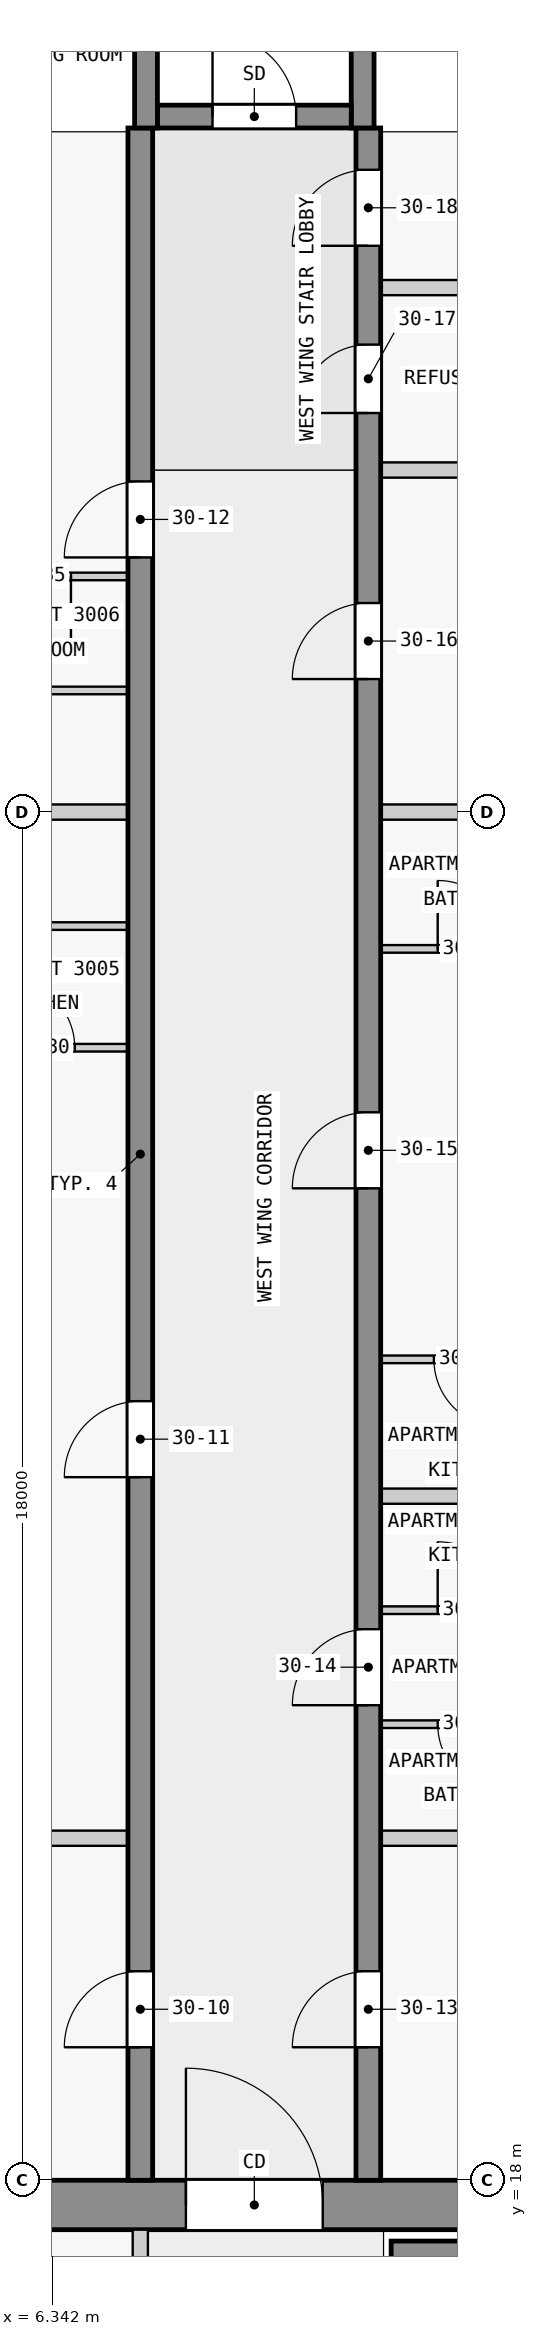
"""IFC4 building model, lengths in metres.
Left out: names, types, materials, properties, quantities, classifications, styles, units other than length and angle.
Written with IfcOpenShell. Run it as: python <this file> out.ifc"""

import sys

from ifc_helpers import new_model, si_unit, direction, frame, frame_2d, origin, place, context, subcontext, project, spatial, rectangle, extrude, element, fill, save


model = new_model("IFC4")
c1 = context("Model", 3, precision=1e-05, world=origin(), true_north=direction((0.0, 1.0)))
c2 = subcontext(c1, "Body", "Model", "MODEL_VIEW")
j1 = project(units=[si_unit("LENGTHUNIT", "METRE"), si_unit("PLANEANGLEUNIT", "RADIAN")], contexts=[c1])
p1 = place(None, origin())
s1 = spatial("IfcSite", under=j1, at=p1, CompositionType="ELEMENT")
p2 = place(p1, origin())
s2 = spatial("IfcBuilding", under=s1, at=p2, CompositionType="ELEMENT")
p3 = place(p2, frame((0.0, 0.0, 116.8)))
s3 = spatial("IfcBuildingStorey", under=s2, at=p3, CompositionType="ELEMENT", Elevation=116.8)
p4 = place(p3, frame((1.65, 17.675, 0.0), z_axis=(0.0, 0.0, 1.0), x_axis=(1.0, 0.0, 0.0)))
e1 = element("IfcWall", 1, at=p4, inside=s3, PredefinedType="SHEAR", context=c2, shape_type="SweptSolid", body=[
    extrude(rectangle(XDim=20.85, YDim=0.65, at=frame_2d((10.425, 0.0))), origin(), (0.0, 0.0, 1.0), 3.25),
])
p5 = place(p4, frame((6.45, 0.0, 0.0)))
e2 = element("IfcOpeningElement", 2, at=p5, cuts=e1, PredefinedType="OPENING", context=c2, shape_type="SweptSolid", body=[
    extrude(rectangle(XDim=1.8, YDim=2.1, at=frame_2d((0.9, 1.05))), frame((0.0, 0.335, 0.0), z_axis=(0.0, -1.0, 0.0), x_axis=(1.0, 0.0, 0.0)), (0.0, 0.0, 1.0), 0.67),
])
p6 = place(p3, frame((10.8, 17.05, 0.0), z_axis=(0.0, 0.0, 1.0), x_axis=(1.0, 0.0, 0.0)))
e3 = element("IfcWall", 3, at=p6, inside=s3, PredefinedType="SHEAR", context=c2, shape_type="SweptSolid", body=[
    extrude(rectangle(XDim=7.8, YDim=0.3, at=frame_2d((3.9, 0.0))), origin(), (0.0, 0.0, 1.0), 3.25),
])
p7 = place(p3, frame((7.725, 45.15, 0.0), z_axis=(0.0, 0.0, 1.0), x_axis=(1.0, 0.0, 0.0)))
e4 = element("IfcWall", 4, at=p7, inside=s3, PredefinedType="SHEAR", context=c2, shape_type="SweptSolid", body=[
    extrude(rectangle(XDim=2.55, YDim=0.3, at=frame_2d((1.275, 0.0))), origin(), (0.0, 0.0, 1.0), 3.5),
])
p8 = place(p7, frame((0.725, 0.0, 0.0)))
e5 = element("IfcOpeningElement", 5, at=p8, cuts=e4, PredefinedType="OPENING", context=c2, shape_type="SweptSolid", body=[
    extrude(rectangle(XDim=1.1, YDim=2.1, at=frame_2d((0.55, 1.05))), frame((0.0, 0.16, 0.0), z_axis=(0.0, -1.0, 0.0), x_axis=(1.0, 0.0, 0.0)), (0.0, 0.0, 1.0), 0.32),
])
for number, where, z_axis, x_axis in (
    (6, (7.575, 45.0, 0.0), (0.0, 0.0, 1.0), (0.0, 1.0, 0.0)),
    (7, (10.425, 45.0, 0.0), (0.0, 0.0, 1.0), (0.0, 1.0, 0.0)),
):
    element("IfcWall", number, at=place(p3, frame(where, z_axis=z_axis, x_axis=x_axis)), inside=s3, PredefinedType="SHEAR", context=c2, shape_type="SweptSolid", body=[
        extrude(rectangle(XDim=7.2, YDim=0.3, at=frame_2d((3.6, 0.0))), origin(), (0.0, 0.0, 1.0), 3.5),
    ])
p9 = place(p3, frame((7.5, 18.0, 0.0), z_axis=(0.0, 0.0, 1.0), x_axis=(0.0, 1.0, 0.0)))
e8 = element("IfcWall", 8, at=p9, inside=s3, PredefinedType="SHEAR", context=c2, shape_type="SweptSolid", body=[
    extrude(rectangle(XDim=27.0, YDim=0.325, at=frame_2d((13.5, 0.0))), origin(), (0.0, 0.0, 1.0), 3.25),
])
p10 = place(p9, frame((1.75, 0.0, 0.0)))
e9 = element("IfcOpeningElement", 9, at=p10, cuts=e8, PredefinedType="OPENING", context=c2, shape_type="SweptSolid", body=[
    extrude(rectangle(XDim=1.0, YDim=2.1, at=frame_2d((0.5, 1.05))), frame((0.0, 0.172, 0.0), z_axis=(0.0, -1.0, 0.0), x_axis=(1.0, 0.0, 0.0)), (0.0, 0.0, 1.0), 0.345),
])
p11 = place(p9, frame((9.25, 0.0, 0.0)))
e10 = element("IfcOpeningElement", 10, at=p11, cuts=e8, PredefinedType="OPENING", context=c2, shape_type="SweptSolid", body=[
    extrude(rectangle(XDim=1.0, YDim=2.1, at=frame_2d((0.5, 1.05))), frame((0.0, 0.172, 0.0), z_axis=(0.0, -1.0, 0.0), x_axis=(1.0, 0.0, 0.0)), (0.0, 0.0, 1.0), 0.345),
])
p12 = place(p9, frame((21.35, 0.0, 0.0)))
e11 = element("IfcOpeningElement", 11, at=p12, cuts=e8, PredefinedType="OPENING", context=c2, shape_type="SweptSolid", body=[
    extrude(rectangle(XDim=1.0, YDim=2.1, at=frame_2d((0.5, 1.05))), frame((0.0, 0.172, 0.0), z_axis=(0.0, -1.0, 0.0), x_axis=(1.0, 0.0, 0.0)), (0.0, 0.0, 1.0), 0.345),
])
p13 = place(p3, frame((10.5, 18.0, 0.0), z_axis=(0.0, 0.0, 1.0), x_axis=(0.0, 1.0, 0.0)))
e12 = element("IfcWall", 12, at=p13, inside=s3, PredefinedType="SHEAR", context=c2, shape_type="SweptSolid", body=[
    extrude(rectangle(XDim=27.0, YDim=0.325, at=frame_2d((13.5, 0.0))), origin(), (0.0, 0.0, 1.0), 3.25),
])
p14 = place(p13, frame((1.75, 0.0, 0.0)))
e13 = element("IfcOpeningElement", 13, at=p14, cuts=e12, PredefinedType="OPENING", context=c2, shape_type="SweptSolid", body=[
    extrude(rectangle(XDim=1.0, YDim=2.1, at=frame_2d((0.5, 1.05))), frame((0.0, 0.172, 0.0), z_axis=(0.0, -1.0, 0.0), x_axis=(1.0, 0.0, 0.0)), (0.0, 0.0, 1.0), 0.345),
])
p15 = place(p13, frame((6.25, 0.0, 0.0)))
e14 = element("IfcOpeningElement", 14, at=p15, cuts=e12, PredefinedType="OPENING", context=c2, shape_type="SweptSolid", body=[
    extrude(rectangle(XDim=1.0, YDim=2.1, at=frame_2d((0.5, 1.05))), frame((0.0, 0.172, 0.0), z_axis=(0.0, -1.0, 0.0), x_axis=(1.0, 0.0, 0.0)), (0.0, 0.0, 1.0), 0.345),
])
p16 = place(p13, frame((13.05, 0.0, 0.0)))
e15 = element("IfcOpeningElement", 15, at=p16, cuts=e12, PredefinedType="OPENING", context=c2, shape_type="SweptSolid", body=[
    extrude(rectangle(XDim=1.0, YDim=2.1, at=frame_2d((0.5, 1.05))), frame((0.0, 0.172, 0.0), z_axis=(0.0, -1.0, 0.0), x_axis=(1.0, 0.0, 0.0)), (0.0, 0.0, 1.0), 0.345),
])
p17 = place(p13, frame((19.75, 0.0, 0.0)))
e16 = element("IfcOpeningElement", 16, at=p17, cuts=e12, PredefinedType="OPENING", context=c2, shape_type="SweptSolid", body=[
    extrude(rectangle(XDim=1.0, YDim=2.1, at=frame_2d((0.5, 1.05))), frame((0.0, 0.172, 0.0), z_axis=(0.0, -1.0, 0.0), x_axis=(1.0, 0.0, 0.0)), (0.0, 0.0, 1.0), 0.345),
])
p18 = place(p13, frame((23.25, 0.0, 0.0)))
e17 = element("IfcOpeningElement", 17, at=p18, cuts=e12, PredefinedType="OPENING", context=c2, shape_type="SweptSolid", body=[
    extrude(rectangle(XDim=0.9, YDim=2.1, at=frame_2d((0.45, 1.05))), frame((0.0, 0.172, 0.0), z_axis=(0.0, -1.0, 0.0), x_axis=(1.0, 0.0, 0.0)), (0.0, 0.0, 1.0), 0.345),
])
p19 = place(p13, frame((25.45, 0.0, 0.0)))
e18 = element("IfcOpeningElement", 18, at=p19, cuts=e12, PredefinedType="OPENING", context=c2, shape_type="SweptSolid", body=[
    extrude(rectangle(XDim=1.0, YDim=2.1, at=frame_2d((0.5, 1.05))), frame((0.0, 0.172, 0.0), z_axis=(0.0, -1.0, 0.0), x_axis=(1.0, 0.0, 0.0)), (0.0, 0.0, 1.0), 0.345),
])
p20 = place(p3, frame((7.5, 10.1, 0.0), z_axis=(0.0, 0.0, 1.0), x_axis=(0.0, 1.0, 0.0)))
e19 = element("IfcWall", 19, at=p20, inside=s3, PredefinedType="PARTITIONING", context=c2, shape_type="SweptSolid", body=[
    extrude(rectangle(XDim=7.25, YDim=0.2, at=frame_2d((3.625, 0.0))), origin(), (0.0, 0.0, 1.0), 3.25),
])
p21 = place(p20, frame((1.5, 0.0, 0.0)))
e20 = element("IfcOpeningElement", 20, at=p21, cuts=e19, PredefinedType="OPENING", context=c2, shape_type="SweptSolid", body=[
    extrude(rectangle(XDim=0.9, YDim=2.1, at=frame_2d((0.45, 1.05))), frame((0.0, 0.11, 0.0), z_axis=(0.0, -1.0, 0.0), x_axis=(1.0, 0.0, 0.0)), (0.0, 0.0, 1.0), 0.22),
])
p22 = place(p20, frame((5.125, 0.0, 0.0)))
e21 = element("IfcOpeningElement", 21, at=p22, cuts=e19, PredefinedType="OPENING", context=c2, shape_type="SweptSolid", body=[
    extrude(rectangle(XDim=0.9, YDim=2.1, at=frame_2d((0.45, 1.05))), frame((0.0, 0.11, 0.0), z_axis=(0.0, -1.0, 0.0), x_axis=(1.0, 0.0, 0.0)), (0.0, 0.0, 1.0), 0.22),
])
for number, where, z_axis, x_axis in (
    (22, (7.337, 22.5, 0.0), (0.0, 0.0, 1.0), (-1.0, 0.0, 0.0)),
    (23, (17.85, 22.5, 0.0), (0.0, 0.0, 1.0), (-1.0, 0.0, 0.0)),
):
    element("IfcWall", number, at=place(p3, frame(where, z_axis=z_axis, x_axis=x_axis)), inside=s3, PredefinedType="PARTITIONING", context=c2, shape_type="SweptSolid", body=[
        extrude(rectangle(XDim=7.188, YDim=0.2, at=frame_2d((3.594, 0.0))), origin(), (0.0, 0.0, 1.0), 3.25),
    ])
p23 = place(p3, frame((13.062, 24.0, 0.0), z_axis=(0.0, 0.0, 1.0), x_axis=(-1.0, 0.0, 0.0)))
e24 = element("IfcWall", 24, at=p23, inside=s3, PredefinedType="PARTITIONING", context=c2, shape_type="SweptSolid", body=[
    extrude(rectangle(XDim=2.4, YDim=0.1, at=frame_2d((1.2, 0.0))), origin(), (0.0, 0.0, 1.0), 3.25),
])
p24 = place(p23, frame((0.75, 0.0, 0.0)))
e25 = element("IfcOpeningElement", 25, at=p24, cuts=e24, PredefinedType="OPENING", context=c2, shape_type="SweptSolid", body=[
    extrude(rectangle(XDim=0.9, YDim=2.1, at=frame_2d((0.45, 1.05))), frame((0.0, 0.06, 0.0), z_axis=(0.0, -1.0, 0.0), x_axis=(1.0, 0.0, 0.0)), (0.0, 0.0, 1.0), 0.12),
])
p25 = place(p3, frame((10.663, 25.5, 0.0), z_axis=(0.0, 0.0, 1.0), x_axis=(1.0, 0.0, 0.0)))
e26 = element("IfcWall", 26, at=p25, inside=s3, PredefinedType="PARTITIONING", context=c2, shape_type="SweptSolid", body=[
    extrude(rectangle(XDim=2.35, YDim=0.1, at=frame_2d((1.175, 0.0))), origin(), (0.0, 0.0, 1.0), 3.25),
])
p26 = place(p25, frame((0.75, 0.0, 0.0)))
e27 = element("IfcOpeningElement", 27, at=p26, cuts=e26, PredefinedType="OPENING", context=c2, shape_type="SweptSolid", body=[
    extrude(rectangle(XDim=0.9, YDim=2.1, at=frame_2d((0.45, 1.05))), frame((0.0, 0.06, 0.0), z_axis=(0.0, -1.0, 0.0), x_axis=(1.0, 0.0, 0.0)), (0.0, 0.0, 1.0), 0.12),
])
p27 = place(p3, frame((12.962, 27.0, 0.0), z_axis=(0.0, 0.0, 1.0), x_axis=(-1.0, 0.0, 0.0)))
e28 = element("IfcWall", 28, at=p27, inside=s3, PredefinedType="PARTITIONING", context=c2, shape_type="SweptSolid", body=[
    extrude(rectangle(XDim=2.3, YDim=0.2, at=frame_2d((1.15, 0.0))), origin(), (0.0, 0.0, 1.0), 3.25),
])
p28 = place(p3, frame((13.012, 28.8, 0.0), z_axis=(0.0, 0.0, 1.0), x_axis=(-1.0, 0.0, 0.0)))
e29 = element("IfcWall", 29, at=p28, inside=s3, PredefinedType="PARTITIONING", context=c2, shape_type="SweptSolid", body=[
    extrude(rectangle(XDim=2.35, YDim=0.1, at=frame_2d((1.175, 0.0))), origin(), (0.0, 0.0, 1.0), 3.25),
])
p29 = place(p28, frame((0.75, 0.0, 0.0)))
e30 = element("IfcOpeningElement", 30, at=p29, cuts=e29, PredefinedType="OPENING", context=c2, shape_type="SweptSolid", body=[
    extrude(rectangle(XDim=0.9, YDim=2.1, at=frame_2d((0.45, 1.05))), frame((0.0, 0.06, 0.0), z_axis=(0.0, -1.0, 0.0), x_axis=(1.0, 0.0, 0.0)), (0.0, 0.0, 1.0), 0.12),
])
p30 = place(p3, frame((4.988, 32.9, 0.0), z_axis=(0.0, 0.0, 1.0), x_axis=(1.0, 0.0, 0.0)))
e31 = element("IfcWall", 31, at=p30, inside=s3, PredefinedType="PARTITIONING", context=c2, shape_type="SweptSolid", body=[
    extrude(rectangle(XDim=2.35, YDim=0.1, at=frame_2d((1.175, 0.0))), origin(), (0.0, 0.0, 1.0), 3.25),
])
p31 = place(p30, frame((0.75, 0.0, 0.0)))
e32 = element("IfcOpeningElement", 32, at=p31, cuts=e31, PredefinedType="OPENING", context=c2, shape_type="SweptSolid", body=[
    extrude(rectangle(XDim=0.9, YDim=2.1, at=frame_2d((0.45, 1.05))), frame((0.0, 0.06, 0.0), z_axis=(0.0, -1.0, 0.0), x_axis=(1.0, 0.0, 0.0)), (0.0, 0.0, 1.0), 0.12),
])
p32 = place(p3, frame((10.663, 34.2, 0.0), z_axis=(0.0, 0.0, 1.0), x_axis=(1.0, 0.0, 0.0)))
e33 = element("IfcWall", 33, at=p32, inside=s3, PredefinedType="PARTITIONING", context=c2, shape_type="SweptSolid", body=[
    extrude(rectangle(XDim=2.35, YDim=0.1, at=frame_2d((1.175, 0.0))), origin(), (0.0, 0.0, 1.0), 3.25),
])
p33 = place(p32, frame((0.75, 0.0, 0.0)))
e34 = element("IfcOpeningElement", 34, at=p33, cuts=e33, PredefinedType="OPENING", context=c2, shape_type="SweptSolid", body=[
    extrude(rectangle(XDim=0.9, YDim=2.1, at=frame_2d((0.45, 1.05))), frame((0.0, 0.06, 0.0), z_axis=(0.0, -1.0, 0.0), x_axis=(1.0, 0.0, 0.0)), (0.0, 0.0, 1.0), 0.12),
])
p34 = place(p3, frame((7.337, 34.5, 0.0), z_axis=(0.0, 0.0, 1.0), x_axis=(-1.0, 0.0, 0.0)))
e35 = element("IfcWall", 35, at=p34, inside=s3, PredefinedType="PARTITIONING", context=c2, shape_type="SweptSolid", body=[
    extrude(rectangle(XDim=2.35, YDim=0.1, at=frame_2d((1.175, 0.0))), origin(), (0.0, 0.0, 1.0), 3.25),
])
p35 = place(p3, frame((7.337, 36.0, 0.0), z_axis=(0.0, 0.0, 1.0), x_axis=(-1.0, 0.0, 0.0)))
e36 = element("IfcWall", 36, at=p35, inside=s3, PredefinedType="PARTITIONING", context=c2, shape_type="SweptSolid", body=[
    extrude(rectangle(XDim=2.3, YDim=0.2, at=frame_2d((1.15, 0.0))), origin(), (0.0, 0.0, 1.0), 3.25),
])
p36 = place(p3, frame((16.6, 36.0, 0.0), z_axis=(0.0, 0.0, 1.0), x_axis=(-1.0, 0.0, 0.0)))
e37 = element("IfcWall", 37, at=p36, inside=s3, PredefinedType="PARTITIONING", context=c2, shape_type="SweptSolid", body=[
    extrude(rectangle(XDim=5.938, YDim=0.2, at=frame_2d((2.969, 0.0))), origin(), (0.0, 0.0, 1.0), 3.25),
])
p37 = place(p3, frame((7.337, 37.6, 0.0), z_axis=(0.0, 0.0, 1.0), x_axis=(-1.0, 0.0, 0.0)))
e38 = element("IfcWall", 38, at=p37, inside=s3, PredefinedType="PARTITIONING", context=c2, shape_type="SweptSolid", body=[
    extrude(rectangle(XDim=2.35, YDim=0.1, at=frame_2d((1.175, 0.0))), origin(), (0.0, 0.0, 1.0), 3.25),
])
p38 = place(p3, frame((7.337, 39.1, 0.0), z_axis=(0.0, 0.0, 1.0), x_axis=(-1.0, 0.0, 0.0)))
e39 = element("IfcWall", 39, at=p38, inside=s3, PredefinedType="PARTITIONING", context=c2, shape_type="SweptSolid", body=[
    extrude(rectangle(XDim=2.35, YDim=0.1, at=frame_2d((1.175, 0.0))), origin(), (0.0, 0.0, 1.0), 3.25),
])
p39 = place(p38, frame((0.75, 0.0, 0.0)))
e40 = element("IfcOpeningElement", 40, at=p39, cuts=e39, PredefinedType="OPENING", context=c2, shape_type="SweptSolid", body=[
    extrude(rectangle(XDim=0.9, YDim=2.1, at=frame_2d((0.45, 1.05))), frame((0.0, 0.06, 0.0), z_axis=(0.0, -1.0, 0.0), x_axis=(1.0, 0.0, 0.0)), (0.0, 0.0, 1.0), 0.12),
])
p40 = place(p3, frame((18.08, 40.5, 0.0), z_axis=(0.0, 0.0, 1.0), x_axis=(-1.0, 0.0, 0.0)))
e41 = element("IfcWall", 41, at=p40, inside=s3, PredefinedType="PARTITIONING", context=c2, shape_type="SweptSolid", body=[
    extrude(rectangle(XDim=7.417, YDim=0.2, at=frame_2d((3.709, 0.0))), origin(), (0.0, 0.0, 1.0), 3.25),
])
p41 = place(p3, frame((13.062, 42.9, 0.0), z_axis=(0.0, 0.0, 1.0), x_axis=(-1.0, 0.0, 0.0)))
e42 = element("IfcWall", 42, at=p41, inside=s3, PredefinedType="PARTITIONING", context=c2, shape_type="SweptSolid", body=[
    extrude(rectangle(XDim=2.4, YDim=0.2, at=frame_2d((1.2, 0.0))), origin(), (0.0, 0.0, 1.0), 3.25),
])
p42 = place(p5, origin())
e43 = element("IfcDoor", 43, at=p42, inside=s3, OperationType="DOUBLE_DOOR_SINGLE_SWING", PredefinedType="DOOR", context=c2, shape_type="SweptSolid", body=[
    extrude(rectangle(XDim=1.8, YDim=2.1, at=frame_2d((0.9, 1.05))), frame((0.0, 0.025, 0.0), z_axis=(0.0, -1.0, 0.0), x_axis=(1.0, 0.0, 0.0)), (0.0, 0.0, 1.0), 0.05),
])
fill(e2, e43)
p43 = place(p8, origin())
e44 = element("IfcDoor", 44, at=p43, inside=s3, OperationType="SINGLE_SWING_LEFT", PredefinedType="DOOR", context=c2, shape_type="SweptSolid", body=[
    extrude(rectangle(XDim=1.1, YDim=2.1, at=frame_2d((0.55, 1.05))), frame((0.0, 0.025, 0.0), z_axis=(0.0, -1.0, 0.0), x_axis=(1.0, 0.0, 0.0)), (0.0, 0.0, 1.0), 0.05),
])
fill(e5, e44)
p44 = place(p10, origin())
e45 = element("IfcDoor", 45, at=p44, inside=s3, OperationType="SINGLE_SWING_LEFT", PredefinedType="DOOR", context=c2, shape_type="SweptSolid", body=[
    extrude(rectangle(XDim=1.0, YDim=2.1, at=frame_2d((0.5, 1.05))), frame((0.0, 0.025, 0.0), z_axis=(0.0, -1.0, 0.0), x_axis=(1.0, 0.0, 0.0)), (0.0, 0.0, 1.0), 0.05),
])
fill(e9, e45)
p45 = place(p11, origin())
e46 = element("IfcDoor", 46, at=p45, inside=s3, OperationType="SINGLE_SWING_LEFT", PredefinedType="DOOR", context=c2, shape_type="SweptSolid", body=[
    extrude(rectangle(XDim=1.0, YDim=2.1, at=frame_2d((0.5, 1.05))), frame((0.0, 0.025, 0.0), z_axis=(0.0, -1.0, 0.0), x_axis=(1.0, 0.0, 0.0)), (0.0, 0.0, 1.0), 0.05),
])
fill(e10, e46)
p46 = place(p12, origin())
e47 = element("IfcDoor", 47, at=p46, inside=s3, OperationType="SINGLE_SWING_RIGHT", PredefinedType="DOOR", context=c2, shape_type="SweptSolid", body=[
    extrude(rectangle(XDim=1.0, YDim=2.1, at=frame_2d((0.5, 1.05))), frame((0.0, 0.025, 0.0), z_axis=(0.0, -1.0, 0.0), x_axis=(1.0, 0.0, 0.0)), (0.0, 0.0, 1.0), 0.05),
])
fill(e11, e47)
p47 = place(p14, origin())
e48 = element("IfcDoor", 48, at=p47, inside=s3, OperationType="SINGLE_SWING_LEFT", PredefinedType="DOOR", context=c2, shape_type="SweptSolid", body=[
    extrude(rectangle(XDim=1.0, YDim=2.1, at=frame_2d((0.5, 1.05))), frame((0.0, 0.025, 0.0), z_axis=(0.0, -1.0, 0.0), x_axis=(1.0, 0.0, 0.0)), (0.0, 0.0, 1.0), 0.05),
])
fill(e13, e48)
p48 = place(p15, origin())
e49 = element("IfcDoor", 49, at=p48, inside=s3, OperationType="SINGLE_SWING_LEFT", PredefinedType="DOOR", context=c2, shape_type="SweptSolid", body=[
    extrude(rectangle(XDim=1.0, YDim=2.1, at=frame_2d((0.5, 1.05))), frame((0.0, 0.025, 0.0), z_axis=(0.0, -1.0, 0.0), x_axis=(1.0, 0.0, 0.0)), (0.0, 0.0, 1.0), 0.05),
])
fill(e14, e49)
p49 = place(p16, origin())
e50 = element("IfcDoor", 50, at=p49, inside=s3, OperationType="SINGLE_SWING_RIGHT", PredefinedType="DOOR", context=c2, shape_type="SweptSolid", body=[
    extrude(rectangle(XDim=1.0, YDim=2.1, at=frame_2d((0.5, 1.05))), frame((0.0, 0.025, 0.0), z_axis=(0.0, -1.0, 0.0), x_axis=(1.0, 0.0, 0.0)), (0.0, 0.0, 1.0), 0.05),
])
fill(e15, e50)
p50 = place(p17, origin())
e51 = element("IfcDoor", 51, at=p50, inside=s3, OperationType="SINGLE_SWING_RIGHT", PredefinedType="DOOR", context=c2, shape_type="SweptSolid", body=[
    extrude(rectangle(XDim=1.0, YDim=2.1, at=frame_2d((0.5, 1.05))), frame((0.0, 0.025, 0.0), z_axis=(0.0, -1.0, 0.0), x_axis=(1.0, 0.0, 0.0)), (0.0, 0.0, 1.0), 0.05),
])
fill(e16, e51)
p51 = place(p18, origin())
e52 = element("IfcDoor", 52, at=p51, inside=s3, OperationType="SINGLE_SWING_RIGHT", PredefinedType="DOOR", context=c2, shape_type="SweptSolid", body=[
    extrude(rectangle(XDim=0.9, YDim=2.1, at=frame_2d((0.45, 1.05))), frame((0.0, 0.025, 0.0), z_axis=(0.0, -1.0, 0.0), x_axis=(1.0, 0.0, 0.0)), (0.0, 0.0, 1.0), 0.05),
])
fill(e17, e52)
p52 = place(p19, origin())
e53 = element("IfcDoor", 53, at=p52, inside=s3, OperationType="SINGLE_SWING_RIGHT", PredefinedType="DOOR", context=c2, shape_type="SweptSolid", body=[
    extrude(rectangle(XDim=1.0, YDim=2.1, at=frame_2d((0.5, 1.05))), frame((0.0, 0.025, 0.0), z_axis=(0.0, -1.0, 0.0), x_axis=(1.0, 0.0, 0.0)), (0.0, 0.0, 1.0), 0.05),
])
fill(e18, e53)
p53 = place(p31, origin())
e54 = element("IfcDoor", 54, at=p53, inside=s3, OperationType="SINGLE_SWING_RIGHT", PredefinedType="DOOR", context=c2, shape_type="SweptSolid", body=[
    extrude(rectangle(XDim=0.9, YDim=2.1, at=frame_2d((0.45, 1.05))), frame((0.0, 0.025, 0.0), z_axis=(0.0, -1.0, 0.0), x_axis=(1.0, 0.0, 0.0)), (0.0, 0.0, 1.0), 0.05),
])
fill(e32, e54)
p54 = place(p39, origin())
e55 = element("IfcDoor", 55, at=p54, inside=s3, OperationType="SINGLE_SWING_RIGHT", PredefinedType="DOOR", context=c2, shape_type="SweptSolid", body=[
    extrude(rectangle(XDim=0.9, YDim=2.1, at=frame_2d((0.45, 1.05))), frame((0.0, 0.025, 0.0), z_axis=(0.0, -1.0, 0.0), x_axis=(1.0, 0.0, 0.0)), (0.0, 0.0, 1.0), 0.05),
])
fill(e40, e55)
p55 = place(p24, origin())
e56 = element("IfcDoor", 56, at=p55, inside=s3, OperationType="SINGLE_SWING_LEFT", PredefinedType="DOOR", context=c2, shape_type="SweptSolid", body=[
    extrude(rectangle(XDim=0.9, YDim=2.1, at=frame_2d((0.45, 1.05))), frame((0.0, 0.025, 0.0), z_axis=(0.0, -1.0, 0.0), x_axis=(1.0, 0.0, 0.0)), (0.0, 0.0, 1.0), 0.05),
])
fill(e25, e56)
p56 = place(p26, origin())
e57 = element("IfcDoor", 57, at=p56, inside=s3, OperationType="SINGLE_SWING_RIGHT", PredefinedType="DOOR", context=c2, shape_type="SweptSolid", body=[
    extrude(rectangle(XDim=0.9, YDim=2.1, at=frame_2d((0.45, 1.05))), frame((0.0, 0.025, 0.0), z_axis=(0.0, -1.0, 0.0), x_axis=(1.0, 0.0, 0.0)), (0.0, 0.0, 1.0), 0.05),
])
fill(e27, e57)
p57 = place(p29, origin())
e58 = element("IfcDoor", 58, at=p57, inside=s3, OperationType="SINGLE_SWING_RIGHT", PredefinedType="DOOR", context=c2, shape_type="SweptSolid", body=[
    extrude(rectangle(XDim=0.9, YDim=2.1, at=frame_2d((0.45, 1.05))), frame((0.0, 0.025, 0.0), z_axis=(0.0, -1.0, 0.0), x_axis=(1.0, 0.0, 0.0)), (0.0, 0.0, 1.0), 0.05),
])
fill(e30, e58)
p58 = place(p33, origin())
e59 = element("IfcDoor", 59, at=p58, inside=s3, OperationType="SINGLE_SWING_RIGHT", PredefinedType="DOOR", context=c2, shape_type="SweptSolid", body=[
    extrude(rectangle(XDim=0.9, YDim=2.1, at=frame_2d((0.45, 1.05))), frame((0.0, 0.025, 0.0), z_axis=(0.0, -1.0, 0.0), x_axis=(1.0, 0.0, 0.0)), (0.0, 0.0, 1.0), 0.05),
])
fill(e34, e59)
save(model, sys.argv[1])
